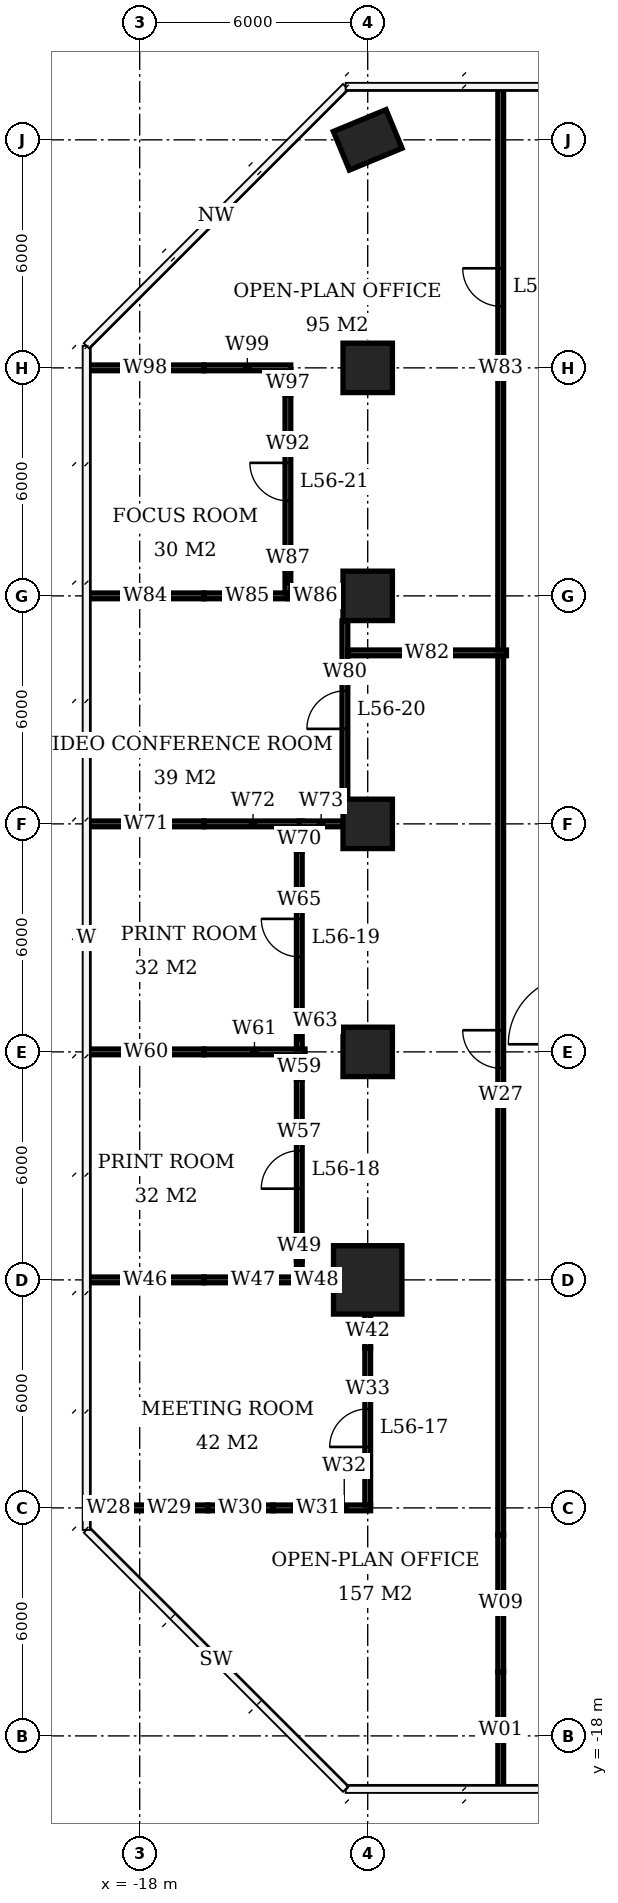
"""IFC4 building model, lengths in metres.
Left out: names, types, materials, properties, quantities, classifications, styles, units other than length and angle.
Written with IfcOpenShell. Run it as: python <this file> out.ifc"""

import sys

from ifc_helpers import new_model, si_unit, direction, frame, frame_2d, origin, origin_2d, place, context, subcontext, project, spatial, rectangle, extrude, element, fill, save


model = new_model("IFC4")
c1 = context("Model", 3, precision=1e-05, world=origin(), true_north=direction((0.0, 1.0)))
c2 = subcontext(c1, "Body", "Model", "MODEL_VIEW")
j1 = project(units=[si_unit("LENGTHUNIT", "METRE"), si_unit("PLANEANGLEUNIT", "RADIAN")], contexts=[c1])
p1 = place(None, origin())
s1 = spatial("IfcSite", under=j1, at=p1, CompositionType="ELEMENT")
p2 = place(p1, origin())
s2 = spatial("IfcBuilding", under=s1, at=p2, CompositionType="ELEMENT")
p3 = place(p2, frame((0.0, 0.0, 227.9)))
s3 = spatial("IfcBuildingStorey", under=s2, at=p3, CompositionType="ELEMENT", Elevation=227.9)
p4 = place(p3, frame((-12.0, -6.0, 0.0), z_axis=(0.0, 0.0, 1.0), x_axis=(1.0, 0.0, 0.0)))
e1 = element("IfcColumn", 1, at=p4, inside=s3, PredefinedType="COLUMN", context=c2, shape_type="SweptSolid", body=[
    extrude(rectangle(XDim=1.8, YDim=1.8, at=origin_2d()), origin(), (0.0, 0.0, 1.0), 3.9),
])
for number, where, z_axis, x_axis in (
    (2, (-12.0, 0.0, 0.0), (0.0, 0.0, 1.0), (1.0, 0.0, 0.0)),
    (3, (-12.0, 6.0, 0.0), (0.0, 0.0, 1.0), (1.0, 0.0, 0.0)),
    (4, (-12.0, 12.0, 0.0), (0.0, 0.0, 1.0), (1.0, 0.0, 0.0)),
    (5, (-12.0, 18.0, 0.0), (0.0, 0.0, 1.0), (1.0, 0.0, 0.0)),
):
    element("IfcColumn", number, at=place(p3, frame(where, z_axis=z_axis, x_axis=x_axis)), inside=s3, PredefinedType="COLUMN", context=c2, shape_type="SweptSolid", body=[
        extrude(rectangle(XDim=1.3, YDim=1.3, at=origin_2d()), origin(), (0.0, 0.0, 1.0), 3.9),
    ])
p5 = place(p3, frame((-12.0, 24.0, 0.0), z_axis=(0.0, 0.0, 1.0), x_axis=(0.923879532511, 0.382683432365, 0.0)))
e6 = element("IfcColumn", 6, at=p5, inside=s3, PredefinedType="COLUMN", context=c2, shape_type="SweptSolid", body=[
    extrude(rectangle(XDim=1.5, YDim=1.1, at=origin_2d()), origin(), (0.0, 0.0, 1.0), 3.9),
])
p6 = place(p3, frame((-19.4, -12.0, 0.0), z_axis=(0.0, 0.0, 1.0), x_axis=(1.0, 0.0, 0.0)))
e7 = element("IfcWall", 7, at=p6, inside=s3, PredefinedType="PARTITIONING", context=c2, shape_type="SweptSolid", body=[
    extrude(rectangle(XDim=1.163, YDim=0.15, at=frame_2d((0.582, 0.0))), origin(), (0.0, 0.0, 1.0), 3.65),
])
p7 = place(p3, frame((-18.237, -12.0, 0.0), z_axis=(0.0, 0.0, 1.0), x_axis=(1.0, 0.0, 0.0)))
e8 = element("IfcWall", 8, at=p7, inside=s3, PredefinedType="PARTITIONING", context=c2, shape_type="SweptSolid", body=[
    extrude(rectangle(XDim=2.029, YDim=0.15, at=frame_2d((1.015, 0.0))), origin(), (0.0, 0.0, 1.0), 2.65),
])
p8 = place(p3, frame((-16.208, -12.0, 0.0), z_axis=(0.0, 0.0, 1.0), x_axis=(1.0, 0.0, 0.0)))
e9 = element("IfcWall", 9, at=p8, inside=s3, PredefinedType="PARTITIONING", context=c2, shape_type="SweptSolid", body=[
    extrude(rectangle(XDim=1.718, YDim=0.15, at=frame_2d((0.859, 0.0))), origin(), (0.0, 0.0, 1.0), 3.65),
])
p9 = place(p3, frame((-14.49, -12.0, 0.0), z_axis=(0.0, 0.0, 1.0), x_axis=(1.0, 0.0, 0.0)))
e10 = element("IfcWall", 10, at=p9, inside=s3, PredefinedType="PARTITIONING", context=c2, shape_type="SweptSolid", body=[
    extrude(rectangle(XDim=1.18, YDim=0.15, at=frame_2d((0.59, 0.0))), origin(), (0.0, 0.0, 1.0), 2.65),
])
p10 = place(p3, frame((-13.31, -12.0, 0.0), z_axis=(0.0, 0.0, 1.0), x_axis=(1.0, 0.0, 0.0)))
e11 = element("IfcWall", 11, at=p10, inside=s3, PredefinedType="PARTITIONING", context=c2, shape_type="SweptSolid", body=[
    extrude(rectangle(XDim=1.385, YDim=0.15, at=frame_2d((0.692, 0.0))), origin(), (0.0, 0.0, 1.0), 3.65),
])
p11 = place(p3, frame((-19.4, -6.0, 0.0), z_axis=(0.0, 0.0, 1.0), x_axis=(1.0, 0.0, 0.0)))
e12 = element("IfcWall", 12, at=p11, inside=s3, PredefinedType="PARTITIONING", context=c2, shape_type="SweptSolid", body=[
    extrude(rectangle(XDim=3.09, YDim=0.15, at=frame_2d((1.545, 0.0))), origin(), (0.0, 0.0, 1.0), 3.65),
])
p12 = place(p3, frame((-16.31, -6.0, 0.0), z_axis=(0.0, 0.0, 1.0), x_axis=(1.0, 0.0, 0.0)))
e13 = element("IfcWall", 13, at=p12, inside=s3, PredefinedType="PARTITIONING", context=c2, shape_type="SweptSolid", body=[
    extrude(rectangle(XDim=2.585, YDim=0.15, at=frame_2d((1.292, 0.0))), origin(), (0.0, 0.0, 1.0), 2.65),
])
p13 = place(p3, frame((-13.8, -6.0, 0.0), z_axis=(0.0, 0.0, 1.0), x_axis=(1.0, 0.0, 0.0)))
e14 = element("IfcWall", 14, at=p13, inside=s3, PredefinedType="PARTITIONING", context=c2, shape_type="SweptSolid", body=[
    extrude(rectangle(XDim=0.9, YDim=0.15, at=frame_2d((0.45, 0.0))), origin(), (0.0, 0.0, 1.0), 2.65),
])
p14 = place(p3, frame((-19.35, 0.0, 0.0), z_axis=(0.0, 0.0, 1.0), x_axis=(1.0, 0.0, 0.0)))
e15 = element("IfcWall", 15, at=p14, inside=s3, PredefinedType="PARTITIONING", context=c2, shape_type="SweptSolid", body=[
    extrude(rectangle(XDim=3.04, YDim=0.15, at=frame_2d((1.52, 0.0))), origin(), (0.0, 0.0, 1.0), 3.65),
])
p15 = place(p3, frame((-16.31, 0.0, 0.0), z_axis=(0.0, 0.0, 1.0), x_axis=(1.0, 0.0, 0.0)))
e16 = element("IfcWall", 16, at=p15, inside=s3, PredefinedType="PARTITIONING", context=c2, shape_type="SweptSolid", body=[
    extrude(rectangle(XDim=2.66, YDim=0.15, at=frame_2d((1.33, 0.0))), origin(), (0.0, 0.0, 1.0), 2.65),
])
p16 = place(p3, frame((-19.35, 6.0, 0.0), z_axis=(0.0, 0.0, 1.0), x_axis=(1.0, 0.0, 0.0)))
e17 = element("IfcWall", 17, at=p16, inside=s3, PredefinedType="PARTITIONING", context=c2, shape_type="SweptSolid", body=[
    extrude(rectangle(XDim=3.04, YDim=0.15, at=frame_2d((1.52, 0.0))), origin(), (0.0, 0.0, 1.0), 3.65),
])
p17 = place(p3, frame((-16.31, 6.0, 0.0), z_axis=(0.0, 0.0, 1.0), x_axis=(1.0, 0.0, 0.0)))
e18 = element("IfcWall", 18, at=p17, inside=s3, PredefinedType="PARTITIONING", context=c2, shape_type="SweptSolid", body=[
    extrude(rectangle(XDim=2.585, YDim=0.15, at=frame_2d((1.292, 0.0))), origin(), (0.0, 0.0, 1.0), 2.65),
])
p18 = place(p3, frame((-13.8, 6.0, 0.0), z_axis=(0.0, 0.0, 1.0), x_axis=(1.0, 0.0, 0.0)))
e19 = element("IfcWall", 19, at=p18, inside=s3, PredefinedType="PARTITIONING", context=c2, shape_type="SweptSolid", body=[
    extrude(rectangle(XDim=1.15, YDim=0.15, at=frame_2d((0.575, 0.0))), origin(), (0.0, 0.0, 1.0), 2.65),
])
p19 = place(p3, frame((-19.4, 12.0, 0.0), z_axis=(0.0, 0.0, 1.0), x_axis=(1.0, 0.0, 0.0)))
e20 = element("IfcWall", 20, at=p19, inside=s3, PredefinedType="PARTITIONING", context=c2, shape_type="SweptSolid", body=[
    extrude(rectangle(XDim=3.09, YDim=0.15, at=frame_2d((1.545, 0.0))), origin(), (0.0, 0.0, 1.0), 3.65),
])
p20 = place(p3, frame((-16.31, 12.0, 0.0), z_axis=(0.0, 0.0, 1.0), x_axis=(1.0, 0.0, 0.0)))
e21 = element("IfcWall", 21, at=p20, inside=s3, PredefinedType="PARTITIONING", context=c2, shape_type="SweptSolid", body=[
    extrude(rectangle(XDim=2.285, YDim=0.15, at=frame_2d((1.143, 0.0))), origin(), (0.0, 0.0, 1.0), 2.65),
])
p21 = place(p3, frame((-14.1, 12.0, 0.0), z_axis=(0.0, 0.0, 1.0), x_axis=(1.0, 0.0, 0.0)))
e22 = element("IfcWall", 22, at=p21, inside=s3, PredefinedType="PARTITIONING", context=c2, shape_type="SweptSolid", body=[
    extrude(rectangle(XDim=1.45, YDim=0.15, at=frame_2d((0.725, 0.0))), origin(), (0.0, 0.0, 1.0), 2.65),
])
p22 = place(p3, frame((-19.4, 18.0, 0.0), z_axis=(0.0, 0.0, 1.0), x_axis=(1.0, 0.0, 0.0)))
e23 = element("IfcWall", 23, at=p22, inside=s3, PredefinedType="PARTITIONING", context=c2, shape_type="SweptSolid", body=[
    extrude(rectangle(XDim=3.09, YDim=0.15, at=frame_2d((1.545, 0.0))), origin(), (0.0, 0.0, 1.0), 3.65),
])
p23 = place(p3, frame((-16.31, 18.0, 0.0), z_axis=(0.0, 0.0, 1.0), x_axis=(1.0, 0.0, 0.0)))
e24 = element("IfcWall", 24, at=p23, inside=s3, PredefinedType="PARTITIONING", context=c2, shape_type="SweptSolid", body=[
    extrude(rectangle(XDim=2.285, YDim=0.15, at=frame_2d((1.143, 0.0))), origin(), (0.0, 0.0, 1.0), 2.65),
])
p24 = place(p3, frame((-14.1, 12.075, 0.0), z_axis=(0.0, 0.0, 1.0), x_axis=(0.0, 1.0, 0.0)))
e25 = element("IfcWall", 25, at=p24, inside=s3, PredefinedType="PARTITIONING", context=c2, shape_type="SweptSolid", body=[
    extrude(rectangle(XDim=0.635, YDim=0.15, at=frame_2d((0.317, 0.0))), origin(), (0.0, 0.0, 1.0), 2.65),
])
p25 = place(p3, frame((-14.1, 12.71, 0.0), z_axis=(0.0, 0.0, 1.0), x_axis=(0.0, 1.0, 0.0)))
e26 = element("IfcWall", 26, at=p25, inside=s3, PredefinedType="PARTITIONING", context=c2, shape_type="SweptSolid", body=[
    extrude(rectangle(XDim=4.58, YDim=0.15, at=frame_2d((2.29, 0.0))), origin(), (0.0, 0.0, 1.0), 3.65),
])
p26 = place(p25, frame((1.79, 0.0, 0.0)))
e27 = element("IfcOpeningElement", 27, at=p26, cuts=e26, PredefinedType="OPENING", context=c2, shape_type="SweptSolid", body=[
    extrude(rectangle(XDim=1.0, YDim=2.1, at=frame_2d((0.5, 1.05))), frame((0.0, 0.085, 0.0), z_axis=(0.0, -1.0, 0.0), x_axis=(1.0, 0.0, 0.0)), (0.0, 0.0, 1.0), 0.17),
])
p27 = place(p3, frame((-14.1, 17.29, 0.0), z_axis=(0.0, 0.0, 1.0), x_axis=(0.0, 1.0, 0.0)))
e28 = element("IfcWall", 28, at=p27, inside=s3, PredefinedType="PARTITIONING", context=c2, shape_type="SweptSolid", body=[
    extrude(rectangle(XDim=0.635, YDim=0.15, at=frame_2d((0.317, 0.0))), origin(), (0.0, 0.0, 1.0), 2.65),
])
p28 = place(p3, frame((-13.8, -5.925, 0.0), z_axis=(0.0, 0.0, 1.0), x_axis=(0.0, 1.0, 0.0)))
e29 = element("IfcWall", 29, at=p28, inside=s3, PredefinedType="PARTITIONING", context=c2, shape_type="SweptSolid", body=[
    extrude(rectangle(XDim=0.435, YDim=0.15, at=frame_2d((0.218, 0.0))), origin(), (0.0, 0.0, 1.0), 2.65),
])
p29 = place(p3, frame((-13.8, -5.49, 0.0), z_axis=(0.0, 0.0, 1.0), x_axis=(0.0, 1.0, 0.0)))
e30 = element("IfcWall", 30, at=p29, inside=s3, PredefinedType="PARTITIONING", context=c2, shape_type="SweptSolid", body=[
    extrude(rectangle(XDim=4.78, YDim=0.15, at=frame_2d((2.39, 0.0))), origin(), (0.0, 0.0, 1.0), 3.65),
])
p30 = place(p29, frame((1.89, 0.0, 0.0)))
e31 = element("IfcOpeningElement", 31, at=p30, cuts=e30, PredefinedType="OPENING", context=c2, shape_type="SweptSolid", body=[
    extrude(rectangle(XDim=1.0, YDim=2.1, at=frame_2d((0.5, 1.05))), frame((0.0, 0.085, 0.0), z_axis=(0.0, -1.0, 0.0), x_axis=(1.0, 0.0, 0.0)), (0.0, 0.0, 1.0), 0.17),
])
for number, where, z_axis, x_axis in (
    (32, (-13.8, -0.71, 0.0), (0.0, 0.0, 1.0), (0.0, 1.0, 0.0)),
    (33, (-13.8, 0.075, 0.0), (0.0, 0.0, 1.0), (0.0, 1.0, 0.0)),
):
    element("IfcWall", number, at=place(p3, frame(where, z_axis=z_axis, x_axis=x_axis)), inside=s3, PredefinedType="PARTITIONING", context=c2, shape_type="SweptSolid", body=[
        extrude(rectangle(XDim=0.635, YDim=0.15, at=frame_2d((0.317, 0.0))), origin(), (0.0, 0.0, 1.0), 2.65),
    ])
p31 = place(p3, frame((-13.8, 0.71, 0.0), z_axis=(0.0, 0.0, 1.0), x_axis=(0.0, 1.0, 0.0)))
e34 = element("IfcWall", 34, at=p31, inside=s3, PredefinedType="PARTITIONING", context=c2, shape_type="SweptSolid", body=[
    extrude(rectangle(XDim=4.58, YDim=0.15, at=frame_2d((2.29, 0.0))), origin(), (0.0, 0.0, 1.0), 3.65),
])
p32 = place(p31, frame((1.79, 0.0, 0.0)))
e35 = element("IfcOpeningElement", 35, at=p32, cuts=e34, PredefinedType="OPENING", context=c2, shape_type="SweptSolid", body=[
    extrude(rectangle(XDim=1.0, YDim=2.1, at=frame_2d((0.5, 1.05))), frame((0.0, 0.085, 0.0), z_axis=(0.0, -1.0, 0.0), x_axis=(1.0, 0.0, 0.0)), (0.0, 0.0, 1.0), 0.17),
])
p33 = place(p3, frame((-13.8, 5.29, 0.0), z_axis=(0.0, 0.0, 1.0), x_axis=(0.0, 1.0, 0.0)))
e36 = element("IfcWall", 36, at=p33, inside=s3, PredefinedType="PARTITIONING", context=c2, shape_type="SweptSolid", body=[
    extrude(rectangle(XDim=0.635, YDim=0.15, at=frame_2d((0.317, 0.0))), origin(), (0.0, 0.0, 1.0), 2.65),
])
p34 = place(p3, frame((-12.6, 6.66, 0.0), z_axis=(0.0, 0.0, 1.0), x_axis=(0.0, 1.0, 0.0)))
e37 = element("IfcWall", 37, at=p34, inside=s3, PredefinedType="PARTITIONING", context=c2, shape_type="SweptSolid", body=[
    extrude(rectangle(XDim=4.68, YDim=0.15, at=frame_2d((2.34, 0.0))), origin(), (0.0, 0.0, 1.0), 3.65),
])
p35 = place(p34, frame((1.84, 0.0, 0.0)))
e38 = element("IfcOpeningElement", 38, at=p35, cuts=e37, PredefinedType="OPENING", context=c2, shape_type="SweptSolid", body=[
    extrude(rectangle(XDim=1.0, YDim=2.1, at=frame_2d((0.5, 1.05))), frame((0.0, 0.085, 0.0), z_axis=(0.0, -1.0, 0.0), x_axis=(1.0, 0.0, 0.0)), (0.0, 0.0, 1.0), 0.17),
])
p36 = place(p3, frame((-12.0, -11.925, 0.0), z_axis=(0.0, 0.0, 1.0), x_axis=(0.0, 1.0, 0.0)))
e39 = element("IfcWall", 39, at=p36, inside=s3, PredefinedType="PARTITIONING", context=c2, shape_type="SweptSolid", body=[
    extrude(rectangle(XDim=4.133, YDim=0.15, at=frame_2d((2.066, 0.0))), origin(), (0.0, 0.0, 1.0), 3.65),
])
p37 = place(p36, frame((1.529, 0.0, 0.0)))
e40 = element("IfcOpeningElement", 40, at=p37, cuts=e39, PredefinedType="OPENING", context=c2, shape_type="SweptSolid", body=[
    extrude(rectangle(XDim=1.0, YDim=2.1, at=frame_2d((0.5, 1.05))), frame((0.0, 0.085, 0.0), z_axis=(0.0, -1.0, 0.0), x_axis=(1.0, 0.0, 0.0)), (0.0, 0.0, 1.0), 0.17),
])
p38 = place(p3, frame((-12.0, -7.792, 0.0), z_axis=(0.0, 0.0, 1.0), x_axis=(0.0, 1.0, 0.0)))
e41 = element("IfcWall", 41, at=p38, inside=s3, PredefinedType="PARTITIONING", context=c2, shape_type="SweptSolid", body=[
    extrude(rectangle(XDim=0.892, YDim=0.15, at=frame_2d((0.446, 0.0))), origin(), (0.0, 0.0, 1.0), 2.65),
])
p39 = place(p3, frame((-12.525, 10.5, 0.0), z_axis=(0.0, 0.0, 1.0), x_axis=(1.0, 0.0, 0.0)))
e42 = element("IfcWall", 42, at=p39, inside=s3, PredefinedType="PARTITIONING", context=c2, shape_type="SweptSolid", body=[
    extrude(rectangle(XDim=4.175, YDim=0.15, at=frame_2d((2.087, 0.0))), origin(), (0.0, 0.0, 1.0), 3.65),
])
p40 = place(p3, frame((-8.5, -19.4, 0.0), z_axis=(0.0, 0.0, 1.0), x_axis=(0.0, 1.0, 0.0)))
e43 = element("IfcWall", 43, at=p40, inside=s3, PredefinedType="PARTITIONING", context=c2, shape_type="SweptSolid", body=[
    extrude(rectangle(XDim=3.09, YDim=0.15, at=frame_2d((1.545, 0.0))), origin(), (0.0, 0.0, 1.0), 3.65),
])
p41 = place(p3, frame((-8.5, -16.31, 0.0), z_axis=(0.0, 0.0, 1.0), x_axis=(0.0, 1.0, 0.0)))
e44 = element("IfcWall", 44, at=p41, inside=s3, PredefinedType="PARTITIONING", context=c2, shape_type="SweptSolid", body=[
    extrude(rectangle(XDim=3.602, YDim=0.15, at=frame_2d((1.801, 0.0))), origin(), (0.0, 0.0, 1.0), 2.65),
])
p42 = place(p3, frame((-8.5, -12.708, 0.0), z_axis=(0.0, 0.0, 1.0), x_axis=(0.0, 1.0, 0.0)))
e45 = element("IfcWall", 45, at=p42, inside=s3, PredefinedType="PARTITIONING", context=c2, shape_type="SweptSolid", body=[
    extrude(rectangle(XDim=23.133, YDim=0.15, at=frame_2d((11.566, 0.0))), origin(), (0.0, 0.0, 1.0), 3.65),
])
p43 = place(p42, frame((12.278, 0.0, 0.0)))
e46 = element("IfcOpeningElement", 46, at=p43, cuts=e45, PredefinedType="OPENING", context=c2, shape_type="SweptSolid", body=[
    extrude(rectangle(XDim=1.0, YDim=2.1, at=frame_2d((0.5, 1.05))), frame((0.0, 0.085, 0.0), z_axis=(0.0, -1.0, 0.0), x_axis=(1.0, 0.0, 0.0)), (0.0, 0.0, 1.0), 0.17),
])
p44 = place(p3, frame((-8.5, 10.575, 0.0), z_axis=(0.0, 0.0, 1.0), x_axis=(0.0, 1.0, 0.0)))
e47 = element("IfcWall", 47, at=p44, inside=s3, PredefinedType="PARTITIONING", context=c2, shape_type="SweptSolid", body=[
    extrude(rectangle(XDim=14.825, YDim=0.15, at=frame_2d((7.413, 0.0))), origin(), (0.0, 0.0, 1.0), 3.65),
])
p45 = place(p44, frame((9.045, 0.0, 0.0)))
e48 = element("IfcOpeningElement", 48, at=p45, cuts=e47, PredefinedType="OPENING", context=c2, shape_type="SweptSolid", body=[
    extrude(rectangle(XDim=1.0, YDim=2.1, at=frame_2d((0.5, 1.05))), frame((0.0, 0.085, 0.0), z_axis=(0.0, -1.0, 0.0), x_axis=(1.0, 0.0, 0.0)), (0.0, 0.0, 1.0), 0.17),
])
p46 = place(p37, origin())
e49 = element("IfcDoor", 49, at=p46, inside=s3, OperationType="SINGLE_SWING_LEFT", PredefinedType="DOOR", context=c2, shape_type="SweptSolid", body=[
    extrude(rectangle(XDim=1.0, YDim=2.1, at=frame_2d((0.5, 1.05))), frame((0.0, 0.025, 0.0), z_axis=(0.0, -1.0, 0.0), x_axis=(1.0, 0.0, 0.0)), (0.0, 0.0, 1.0), 0.05),
])
fill(e40, e49)
p47 = place(p30, origin())
e50 = element("IfcDoor", 50, at=p47, inside=s3, OperationType="SINGLE_SWING_LEFT", PredefinedType="DOOR", context=c2, shape_type="SweptSolid", body=[
    extrude(rectangle(XDim=1.0, YDim=2.1, at=frame_2d((0.5, 1.05))), frame((0.0, 0.025, 0.0), z_axis=(0.0, -1.0, 0.0), x_axis=(1.0, 0.0, 0.0)), (0.0, 0.0, 1.0), 0.05),
])
fill(e31, e50)
p48 = place(p32, origin())
e51 = element("IfcDoor", 51, at=p48, inside=s3, OperationType="SINGLE_SWING_RIGHT", PredefinedType="DOOR", context=c2, shape_type="SweptSolid", body=[
    extrude(rectangle(XDim=1.0, YDim=2.1, at=frame_2d((0.5, 1.05))), frame((0.0, 0.025, 0.0), z_axis=(0.0, -1.0, 0.0), x_axis=(1.0, 0.0, 0.0)), (0.0, 0.0, 1.0), 0.05),
])
fill(e35, e51)
p49 = place(p35, origin())
e52 = element("IfcDoor", 52, at=p49, inside=s3, OperationType="SINGLE_SWING_LEFT", PredefinedType="DOOR", context=c2, shape_type="SweptSolid", body=[
    extrude(rectangle(XDim=1.0, YDim=2.1, at=frame_2d((0.5, 1.05))), frame((0.0, 0.025, 0.0), z_axis=(0.0, -1.0, 0.0), x_axis=(1.0, 0.0, 0.0)), (0.0, 0.0, 1.0), 0.05),
])
fill(e38, e52)
p50 = place(p26, origin())
e53 = element("IfcDoor", 53, at=p50, inside=s3, OperationType="SINGLE_SWING_RIGHT", PredefinedType="DOOR", context=c2, shape_type="SweptSolid", body=[
    extrude(rectangle(XDim=1.0, YDim=2.1, at=frame_2d((0.5, 1.05))), frame((0.0, 0.025, 0.0), z_axis=(0.0, -1.0, 0.0), x_axis=(1.0, 0.0, 0.0)), (0.0, 0.0, 1.0), 0.05),
])
fill(e27, e53)
p51 = place(p43, origin())
e54 = element("IfcDoor", 54, at=p51, inside=s3, OperationType="SINGLE_SWING_RIGHT", PredefinedType="DOOR", context=c2, shape_type="SweptSolid", body=[
    extrude(rectangle(XDim=1.0, YDim=2.1, at=frame_2d((0.5, 1.05))), frame((0.0, 0.025, 0.0), z_axis=(0.0, -1.0, 0.0), x_axis=(1.0, 0.0, 0.0)), (0.0, 0.0, 1.0), 0.05),
])
fill(e46, e54)
p52 = place(p45, origin())
e55 = element("IfcDoor", 55, at=p52, inside=s3, OperationType="SINGLE_SWING_RIGHT", PredefinedType="DOOR", context=c2, shape_type="SweptSolid", body=[
    extrude(rectangle(XDim=1.0, YDim=2.1, at=frame_2d((0.5, 1.05))), frame((0.0, 0.025, 0.0), z_axis=(0.0, -1.0, 0.0), x_axis=(1.0, 0.0, 0.0)), (0.0, 0.0, 1.0), 0.05),
])
fill(e48, e55)
save(model, sys.argv[1])
